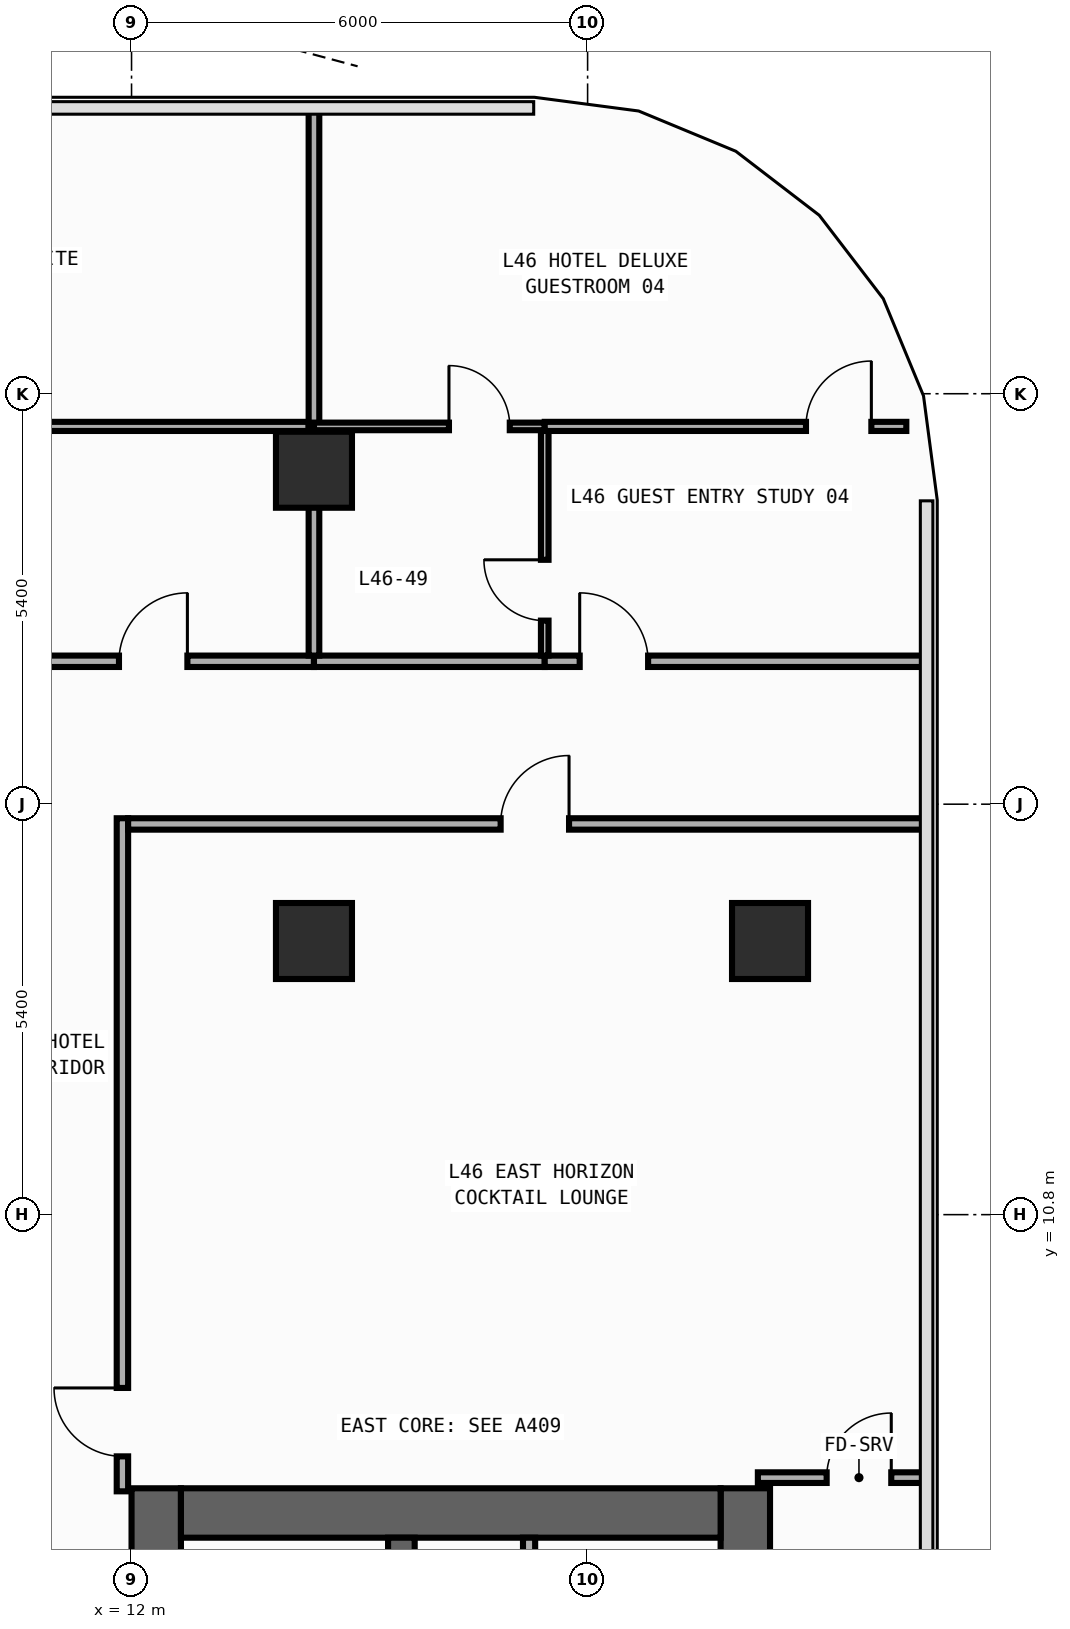
"""IFC4 building model, lengths in metres.
Left out: names, types, materials, properties, quantities, classifications, styles, units other than length and angle.
Written with IfcOpenShell. Run it as: python <this file> out.ifc"""

import sys

from ifc_helpers import new_model, si_unit, direction, frame, frame_2d, origin, origin_2d, place, context, subcontext, project, spatial, rectangle, extrude, element, fill, save


model = new_model("IFC4")
c1 = context("Model", 3, precision=1e-05, world=origin(), true_north=direction((0.0, 1.0)))
c2 = subcontext(c1, "Body", "Model", "MODEL_VIEW")
j1 = project(units=[si_unit("LENGTHUNIT", "METRE"), si_unit("PLANEANGLEUNIT", "RADIAN")], contexts=[c1])
p1 = place(None, origin())
s1 = spatial("IfcSite", under=j1, at=p1, CompositionType="ELEMENT")
p2 = place(p1, origin())
s2 = spatial("IfcBuilding", under=s1, at=p2, CompositionType="ELEMENT")
p3 = place(p2, frame((0.0, 0.0, 199.2)))
s3 = spatial("IfcBuildingStorey", under=s2, at=p3, CompositionType="ELEMENT", Elevation=199.2)
p4 = place(p3, frame((12.325, -19.8, 0.0), z_axis=(0.0, 0.0, 1.0), x_axis=(0.0, 1.0, 0.0)))
e1 = element("IfcWall", 1, at=p4, inside=s3, PredefinedType="SHEAR", context=c2, shape_type="SweptSolid", body=[
    extrude(rectangle(XDim=27.0, YDim=0.65, at=frame_2d((13.5, 0.0))), origin(), (0.0, 0.0, 1.0), 3.54),
])
p5 = place(p4, frame((23.05, 0.0, 0.0)))
e2 = element("IfcOpeningElement", 2, at=p5, cuts=e1, PredefinedType="OPENING", context=c2, shape_type="SweptSolid", body=[
    extrude(rectangle(XDim=1.1, YDim=2.2, at=frame_2d((0.55, 1.1))), frame((0.0, 0.335, 0.0), z_axis=(0.0, -1.0, 0.0), x_axis=(1.0, 0.0, 0.0)), (0.0, 0.0, 1.0), 0.67),
])
p6 = place(p4, frame((19.85, 0.0, 0.0)))
e3 = element("IfcOpeningElement", 3, at=p6, cuts=e1, PredefinedType="OPENING", context=c2, shape_type="SweptSolid", body=[
    extrude(rectangle(XDim=1.1, YDim=2.2, at=frame_2d((0.55, 1.1))), frame((0.0, 0.335, 0.0), z_axis=(0.0, -1.0, 0.0), x_axis=(1.0, 0.0, 0.0)), (0.0, 0.0, 1.0), 0.67),
])
p7 = place(p4, frame((16.65, 0.0, 0.0)))
e4 = element("IfcOpeningElement", 4, at=p7, cuts=e1, PredefinedType="OPENING", context=c2, shape_type="SweptSolid", body=[
    extrude(rectangle(XDim=1.1, YDim=2.2, at=frame_2d((0.55, 1.1))), frame((0.0, 0.335, 0.0), z_axis=(0.0, -1.0, 0.0), x_axis=(1.0, 0.0, 0.0)), (0.0, 0.0, 1.0), 0.67),
])
p8 = place(p4, frame((6.275, 0.0, 0.0)))
e5 = element("IfcOpeningElement", 5, at=p8, cuts=e1, PredefinedType="OPENING", context=c2, shape_type="SweptSolid", body=[
    extrude(rectangle(XDim=0.85, YDim=2.1, at=frame_2d((0.425, 1.05))), frame((0.0, 0.335, 0.0), z_axis=(0.0, -1.0, 0.0), x_axis=(1.0, 0.0, 0.0)), (0.0, 0.0, 1.0), 0.67),
])
p9 = place(p4, frame((8.575, 0.0, 0.0)))
e6 = element("IfcOpeningElement", 6, at=p9, cuts=e1, PredefinedType="OPENING", context=c2, shape_type="SweptSolid", body=[
    extrude(rectangle(XDim=0.85, YDim=2.1, at=frame_2d((0.425, 1.05))), frame((0.0, 0.335, 0.0), z_axis=(0.0, -1.0, 0.0), x_axis=(1.0, 0.0, 0.0)), (0.0, 0.0, 1.0), 0.67),
])
p10 = place(p4, frame((10.675, 0.0, 0.0)))
e7 = element("IfcOpeningElement", 7, at=p10, cuts=e1, PredefinedType="OPENING", context=c2, shape_type="SweptSolid", body=[
    extrude(rectangle(XDim=0.85, YDim=2.1, at=frame_2d((0.425, 1.05))), frame((0.0, 0.335, 0.0), z_axis=(0.0, -1.0, 0.0), x_axis=(1.0, 0.0, 0.0)), (0.0, 0.0, 1.0), 0.67),
])
p11 = place(p4, frame((12.725, 0.0, 0.0)))
e8 = element("IfcOpeningElement", 8, at=p11, cuts=e1, PredefinedType="OPENING", context=c2, shape_type="SweptSolid", body=[
    extrude(rectangle(XDim=1.15, YDim=2.2, at=frame_2d((0.575, 1.1))), frame((0.0, 0.335, 0.0), z_axis=(0.0, -1.0, 0.0), x_axis=(1.0, 0.0, 0.0)), (0.0, 0.0, 1.0), 0.67),
])
p12 = place(p4, frame((25.125, 0.0, 0.0)))
e9 = element("IfcOpeningElement", 9, at=p12, cuts=e1, PredefinedType="OPENING", context=c2, shape_type="SweptSolid", body=[
    extrude(rectangle(XDim=0.85, YDim=2.1, at=frame_2d((0.425, 1.05))), frame((0.0, 0.335, 0.0), z_axis=(0.0, -1.0, 0.0), x_axis=(1.0, 0.0, 0.0)), (0.0, 0.0, 1.0), 0.67),
])
p13 = place(p3, frame((20.075, -19.8, 0.0), z_axis=(0.0, 0.0, 1.0), x_axis=(0.0, 1.0, 0.0)))
e10 = element("IfcWall", 10, at=p13, inside=s3, PredefinedType="SHEAR", context=c2, shape_type="SweptSolid", body=[
    extrude(rectangle(XDim=27.0, YDim=0.65, at=frame_2d((13.5, 0.0))), origin(), (0.0, 0.0, 1.0), 3.54),
])
p14 = place(p3, frame((12.65, 6.875, 0.0), z_axis=(0.0, 0.0, 1.0), x_axis=(1.0, 0.0, 0.0)))
e11 = element("IfcWall", 11, at=p14, inside=s3, PredefinedType="SHEAR", context=c2, shape_type="SweptSolid", body=[
    extrude(rectangle(XDim=7.1, YDim=0.65, at=frame_2d((3.55, 0.0))), origin(), (0.0, 0.0, 1.0), 3.54),
])
p15 = place(p3, frame((15.55, -19.15, 0.0), z_axis=(0.0, 0.0, 1.0), x_axis=(0.0, 1.0, 0.0)))
e12 = element("IfcWall", 12, at=p15, inside=s3, PredefinedType="SHEAR", context=c2, shape_type="SweptSolid", body=[
    extrude(rectangle(XDim=25.7, YDim=0.35, at=frame_2d((12.85, 0.0))), origin(), (0.0, 0.0, 1.0), 3.54),
])
p16 = place(p15, frame((12.075, 0.0, 0.0)))
e13 = element("IfcOpeningElement", 13, at=p16, cuts=e12, PredefinedType="OPENING", context=c2, shape_type="SweptSolid", body=[
    extrude(rectangle(XDim=1.15, YDim=2.2, at=frame_2d((0.575, 1.1))), frame((0.0, 0.185, 0.0), z_axis=(0.0, -1.0, 0.0), x_axis=(1.0, 0.0, 0.0)), (0.0, 0.0, 1.0), 0.37),
])
p17 = place(p15, frame((24.475, 0.0, 0.0)))
e14 = element("IfcOpeningElement", 14, at=p17, cuts=e12, PredefinedType="OPENING", context=c2, shape_type="SweptSolid", body=[
    extrude(rectangle(XDim=0.85, YDim=2.1, at=frame_2d((0.425, 1.05))), frame((0.0, 0.185, 0.0), z_axis=(0.0, -1.0, 0.0), x_axis=(1.0, 0.0, 0.0)), (0.0, 0.0, 1.0), 0.37),
])
for number, where, z_axis, x_axis in (
    (15, (20.4, 14.4, 0.0), (0.0, 0.0, 1.0), (1.0, 0.0, 0.0)),
    (16, (14.4, 14.4, 0.0), (0.0, 0.0, 1.0), (1.0, 0.0, 0.0)),
    (17, (14.4, 20.6, 0.0), (0.0, 0.0, 1.0), (1.0, 0.0, 0.0)),
):
    element("IfcColumn", number, at=place(p3, frame(where, z_axis=z_axis, x_axis=x_axis)), inside=s3, PredefinedType="COLUMN", context=c2, shape_type="SweptSolid", body=[
        extrude(rectangle(XDim=1.0, YDim=1.0, at=origin_2d()), origin(), (0.0, 0.0, 1.0), 3.8),
    ])
p18 = place(p3, frame((17.23, 4.17, 0.0), z_axis=(0.0, 0.0, 1.0), x_axis=(0.0, 1.0, 0.0)))
e18 = element("IfcWall", 18, at=p18, inside=s3, PredefinedType="PARTITIONING", context=c2, shape_type="SweptSolid", body=[
    extrude(rectangle(XDim=2.38, YDim=0.16, at=frame_2d((1.19, 0.0))), origin(), (0.0, 0.0, 1.0), 3.54),
])
p19 = place(p18, frame((0.46, 0.0, 0.0)))
e19 = element("IfcOpeningElement", 19, at=p19, cuts=e18, PredefinedType="OPENING", context=c2, shape_type="SweptSolid", body=[
    extrude(rectangle(XDim=0.85, YDim=2.1, at=frame_2d((0.425, 1.05))), frame((0.0, 0.09, 0.0), z_axis=(0.0, -1.0, 0.0), x_axis=(1.0, 0.0, 0.0)), (0.0, 0.0, 1.0), 0.18),
])
p20 = place(p3, frame((11.88, 7.16, 0.0), z_axis=(0.0, 0.0, 1.0), x_axis=(0.0, 1.0, 0.0)))
e20 = element("IfcWall", 20, at=p20, inside=s3, PredefinedType="PARTITIONING", context=c2, shape_type="SweptSolid", body=[
    extrude(rectangle(XDim=8.855, YDim=0.15, at=frame_2d((4.427, 0.0))), origin(), (0.0, 0.0, 1.0), 3.54),
])
p21 = place(p20, frame((0.46, 0.0, 0.0)))
e21 = element("IfcOpeningElement", 21, at=p21, cuts=e20, PredefinedType="OPENING", context=c2, shape_type="SweptSolid", body=[
    extrude(rectangle(XDim=0.9, YDim=2.15, at=frame_2d((0.45, 1.075))), frame((0.0, 0.085, 0.0), z_axis=(0.0, -1.0, 0.0), x_axis=(1.0, 0.0, 0.0)), (0.0, 0.0, 1.0), 0.17),
])
p22 = place(p3, frame((3.54, 18.08, 0.0), z_axis=(0.0, 0.0, 1.0), x_axis=(1.0, 0.0, 0.0)))
e22 = element("IfcWall", 22, at=p22, inside=s3, PredefinedType="PARTITIONING", context=c2, shape_type="SweptSolid", body=[
    extrude(rectangle(XDim=10.86, YDim=0.15, at=frame_2d((5.43, 0.0))), origin(), (0.0, 0.0, 1.0), 3.54),
])
p23 = place(p22, frame((8.295, 0.0, 0.0)))
e23 = element("IfcOpeningElement", 23, at=p23, cuts=e22, PredefinedType="OPENING", context=c2, shape_type="SweptSolid", body=[
    extrude(rectangle(XDim=0.9, YDim=2.15, at=frame_2d((0.45, 1.075))), frame((0.0, 0.085, 0.0), z_axis=(0.0, -1.0, 0.0), x_axis=(1.0, 0.0, 0.0)), (0.0, 0.0, 1.0), 0.17),
])
p24 = place(p3, frame((14.4, 18.08, 0.0), z_axis=(0.0, 0.0, 1.0), x_axis=(1.0, 0.0, 0.0)))
e24 = element("IfcWall", 24, at=p24, inside=s3, PredefinedType="PARTITIONING", context=c2, shape_type="SweptSolid", body=[
    extrude(rectangle(XDim=3.036, YDim=0.15, at=frame_2d((1.518, 0.0))), origin(), (0.0, 0.0, 1.0), 3.54),
])
p25 = place(p3, frame((17.436, 18.08, 0.0), z_axis=(0.0, 0.0, 1.0), x_axis=(1.0, 0.0, 0.0)))
e25 = element("IfcWall", 25, at=p25, inside=s3, PredefinedType="PARTITIONING", context=c2, shape_type="SweptSolid", body=[
    extrude(rectangle(XDim=5.019, YDim=0.15, at=frame_2d((2.51, 0.0))), origin(), (0.0, 0.0, 1.0), 3.54),
])
p26 = place(p25, frame((0.46, 0.0, 0.0)))
e26 = element("IfcOpeningElement", 26, at=p26, cuts=e25, PredefinedType="OPENING", context=c2, shape_type="SweptSolid", body=[
    extrude(rectangle(XDim=0.9, YDim=2.15, at=frame_2d((0.45, 1.075))), frame((0.0, 0.085, 0.0), z_axis=(0.0, -1.0, 0.0), x_axis=(1.0, 0.0, 0.0)), (0.0, 0.0, 1.0), 0.17),
])
p27 = place(p3, frame((11.955, 15.94, 0.0), z_axis=(0.0, 0.0, 1.0), x_axis=(1.0, 0.0, 0.0)))
e27 = element("IfcWall", 27, at=p27, inside=s3, PredefinedType="PARTITIONING", context=c2, shape_type="SweptSolid", body=[
    extrude(rectangle(XDim=10.5, YDim=0.15, at=frame_2d((5.25, 0.0))), origin(), (0.0, 0.0, 1.0), 3.54),
])
p28 = place(p27, frame((4.901, 0.0, 0.0)))
e28 = element("IfcOpeningElement", 28, at=p28, cuts=e27, PredefinedType="OPENING", context=c2, shape_type="SweptSolid", body=[
    extrude(rectangle(XDim=0.9, YDim=2.15, at=frame_2d((0.45, 1.075))), frame((0.0, 0.085, 0.0), z_axis=(0.0, -1.0, 0.0), x_axis=(1.0, 0.0, 0.0)), (0.0, 0.0, 1.0), 0.17),
])
p29 = place(p3, frame((3.54, 21.17, 0.0), z_axis=(0.0, 0.0, 1.0), x_axis=(1.0, 0.0, 0.0)))
e29 = element("IfcWall", 29, at=p29, inside=s3, PredefinedType="PARTITIONING", context=c2, shape_type="SweptSolid", body=[
    extrude(rectangle(XDim=10.86, YDim=0.12, at=frame_2d((5.43, 0.0))), origin(), (0.0, 0.0, 1.0), 3.54),
])
p30 = place(p29, frame((3.083, 0.0, 0.0)))
e30 = element("IfcOpeningElement", 30, at=p30, cuts=e29, PredefinedType="OPENING", context=c2, shape_type="SweptSolid", body=[
    extrude(rectangle(XDim=0.86, YDim=2.15, at=frame_2d((0.43, 1.075))), frame((0.0, 0.07, 0.0), z_axis=(0.0, -1.0, 0.0), x_axis=(1.0, 0.0, 0.0)), (0.0, 0.0, 1.0), 0.14),
])
p31 = place(p3, frame((14.4, 18.155, 0.0), z_axis=(0.0, 0.0, 1.0), x_axis=(0.0, 1.0, 0.0)))
e31 = element("IfcWall", 31, at=p31, inside=s3, PredefinedType="PARTITIONING", context=c2, shape_type="SweptSolid", body=[
    extrude(rectangle(XDim=3.015, YDim=0.14, at=frame_2d((1.507, 0.0))), origin(), (0.0, 0.0, 1.0), 2.952),
])
p32 = place(p3, frame((14.4, 21.17, 0.0), z_axis=(0.0, 0.0, 1.0), x_axis=(0.0, 1.0, 0.0)))
e32 = element("IfcWall", 32, at=p32, inside=s3, PredefinedType="PARTITIONING", context=c2, shape_type="SweptSolid", body=[
    extrude(rectangle(XDim=4.185, YDim=0.14, at=frame_2d((2.093, 0.0))), origin(), (0.0, 0.0, 1.0), 3.54),
])
p33 = place(p3, frame((17.436, 18.155, 0.0), z_axis=(0.0, 0.0, 1.0), x_axis=(0.0, 1.0, 0.0)))
e33 = element("IfcWall", 33, at=p33, inside=s3, PredefinedType="PARTITIONING", context=c2, shape_type="SweptSolid", body=[
    extrude(rectangle(XDim=2.965, YDim=0.1, at=frame_2d((1.482, 0.0))), origin(), (0.0, 0.0, 1.0), 3.54),
])
p34 = place(p33, frame((0.46, 0.0, 0.0)))
e34 = element("IfcOpeningElement", 34, at=p34, cuts=e33, PredefinedType="OPENING", context=c2, shape_type="SweptSolid", body=[
    extrude(rectangle(XDim=0.8, YDim=2.1, at=frame_2d((0.4, 1.05))), frame((0.0, 0.06, 0.0), z_axis=(0.0, -1.0, 0.0), x_axis=(1.0, 0.0, 0.0)), (0.0, 0.0, 1.0), 0.12),
])
p35 = place(p3, frame((14.4, 21.17, 0.0), z_axis=(0.0, 0.0, 1.0), x_axis=(1.0, 0.0, 0.0)))
e35 = element("IfcWall", 35, at=p35, inside=s3, PredefinedType="PARTITIONING", context=c2, shape_type="SweptSolid", body=[
    extrude(rectangle(XDim=3.036, YDim=0.1, at=frame_2d((1.518, 0.0))), origin(), (0.0, 0.0, 1.0), 3.54),
])
p36 = place(p35, frame((1.776, 0.0, 0.0)))
e36 = element("IfcOpeningElement", 36, at=p36, cuts=e35, PredefinedType="OPENING", context=c2, shape_type="SweptSolid", body=[
    extrude(rectangle(XDim=0.8, YDim=2.1, at=frame_2d((0.4, 1.05))), frame((0.0, 0.06, 0.0), z_axis=(0.0, -1.0, 0.0), x_axis=(1.0, 0.0, 0.0)), (0.0, 0.0, 1.0), 0.12),
])
p37 = place(p3, frame((17.436, 21.17, 0.0), z_axis=(0.0, 0.0, 1.0), x_axis=(1.0, 0.0, 0.0)))
e37 = element("IfcWall", 37, at=p37, inside=s3, PredefinedType="PARTITIONING", context=c2, shape_type="SweptSolid", body=[
    extrude(rectangle(XDim=4.757, YDim=0.12, at=frame_2d((2.378, 0.0))), origin(), (0.0, 0.0, 1.0), 3.54),
])
p38 = place(p37, frame((3.437, 0.0, 0.0)))
e38 = element("IfcOpeningElement", 38, at=p38, cuts=e37, PredefinedType="OPENING", context=c2, shape_type="SweptSolid", body=[
    extrude(rectangle(XDim=0.86, YDim=2.15, at=frame_2d((0.43, 1.075))), frame((0.0, 0.07, 0.0), z_axis=(0.0, -1.0, 0.0), x_axis=(1.0, 0.0, 0.0)), (0.0, 0.0, 1.0), 0.14),
])
p39 = place(p3, frame((20.24, 7.34, 0.0), z_axis=(0.0, 0.0, 1.0), x_axis=(1.0, 0.0, 0.0)))
e39 = element("IfcWall", 39, at=p39, inside=s3, PredefinedType="PARTITIONING", context=c2, shape_type="SweptSolid", body=[
    extrude(rectangle(XDim=2.215, YDim=0.14, at=frame_2d((1.107, 0.0))), origin(), (0.0, 0.0, 1.0), 3.54),
])
p40 = place(p39, frame((0.905, 0.0, 0.0)))
e40 = element("IfcOpeningElement", 40, at=p40, cuts=e39, PredefinedType="OPENING", context=c2, shape_type="SweptSolid", body=[
    extrude(rectangle(XDim=0.85, YDim=2.1, at=frame_2d((0.425, 1.05))), frame((0.0, 0.08, 0.0), z_axis=(0.0, -1.0, 0.0), x_axis=(1.0, 0.0, 0.0)), (0.0, 0.0, 1.0), 0.16),
])
p41 = place(p21, origin())
e41 = element("IfcDoor", 41, at=p41, inside=s3, OperationType="SINGLE_SWING_RIGHT", PredefinedType="DOOR", context=c2, shape_type="SweptSolid", body=[
    extrude(rectangle(XDim=0.9, YDim=2.15, at=frame_2d((0.45, 1.075))), frame((0.0, 0.025, 0.0), z_axis=(0.0, -1.0, 0.0), x_axis=(1.0, 0.0, 0.0)), (0.0, 0.0, 1.0), 0.05),
])
fill(e21, e41)
p42 = place(p23, origin())
e42 = element("IfcDoor", 42, at=p42, inside=s3, OperationType="SINGLE_SWING_RIGHT", PredefinedType="DOOR", context=c2, shape_type="SweptSolid", body=[
    extrude(rectangle(XDim=0.9, YDim=2.15, at=frame_2d((0.45, 1.075))), frame((0.0, 0.025, 0.0), z_axis=(0.0, -1.0, 0.0), x_axis=(1.0, 0.0, 0.0)), (0.0, 0.0, 1.0), 0.05),
])
fill(e23, e42)
p43 = place(p26, origin())
e43 = element("IfcDoor", 43, at=p43, inside=s3, OperationType="SINGLE_SWING_LEFT", PredefinedType="DOOR", context=c2, shape_type="SweptSolid", body=[
    extrude(rectangle(XDim=0.9, YDim=2.15, at=frame_2d((0.45, 1.075))), frame((0.0, 0.025, 0.0), z_axis=(0.0, -1.0, 0.0), x_axis=(1.0, 0.0, 0.0)), (0.0, 0.0, 1.0), 0.05),
])
fill(e26, e43)
p44 = place(p28, origin())
e44 = element("IfcDoor", 44, at=p44, inside=s3, OperationType="SINGLE_SWING_RIGHT", PredefinedType="DOOR", context=c2, shape_type="SweptSolid", body=[
    extrude(rectangle(XDim=0.9, YDim=2.15, at=frame_2d((0.45, 1.075))), frame((0.0, 0.025, 0.0), z_axis=(0.0, -1.0, 0.0), x_axis=(1.0, 0.0, 0.0)), (0.0, 0.0, 1.0), 0.05),
])
fill(e28, e44)
p45 = place(p34, origin())
e45 = element("IfcDoor", 45, at=p45, inside=s3, OperationType="SINGLE_SWING_RIGHT", PredefinedType="DOOR", context=c2, shape_type="SweptSolid", body=[
    extrude(rectangle(XDim=0.8, YDim=2.1, at=frame_2d((0.4, 1.05))), frame((0.0, 0.025, 0.0), z_axis=(0.0, -1.0, 0.0), x_axis=(1.0, 0.0, 0.0)), (0.0, 0.0, 1.0), 0.05),
])
fill(e34, e45)
p46 = place(p36, origin())
e46 = element("IfcDoor", 46, at=p46, inside=s3, OperationType="SINGLE_SWING_LEFT", PredefinedType="DOOR", context=c2, shape_type="SweptSolid", body=[
    extrude(rectangle(XDim=0.8, YDim=2.1, at=frame_2d((0.4, 1.05))), frame((0.0, 0.025, 0.0), z_axis=(0.0, -1.0, 0.0), x_axis=(1.0, 0.0, 0.0)), (0.0, 0.0, 1.0), 0.05),
])
fill(e36, e46)
p47 = place(p38, origin())
e47 = element("IfcDoor", 47, at=p47, inside=s3, OperationType="SINGLE_SWING_RIGHT", PredefinedType="DOOR", context=c2, shape_type="SweptSolid", body=[
    extrude(rectangle(XDim=0.86, YDim=2.15, at=frame_2d((0.43, 1.075))), frame((0.0, 0.025, 0.0), z_axis=(0.0, -1.0, 0.0), x_axis=(1.0, 0.0, 0.0)), (0.0, 0.0, 1.0), 0.05),
])
fill(e38, e47)
p48 = place(p40, origin())
e48 = element("IfcDoor", 48, at=p48, inside=s3, OperationType="SINGLE_SWING_RIGHT", PredefinedType="DOOR", context=c2, shape_type="SweptSolid", body=[
    extrude(rectangle(XDim=0.85, YDim=2.1, at=frame_2d((0.425, 1.05))), frame((0.0, 0.025, 0.0), z_axis=(0.0, -1.0, 0.0), x_axis=(1.0, 0.0, 0.0)), (0.0, 0.0, 1.0), 0.05),
])
fill(e40, e48)
save(model, sys.argv[1])
